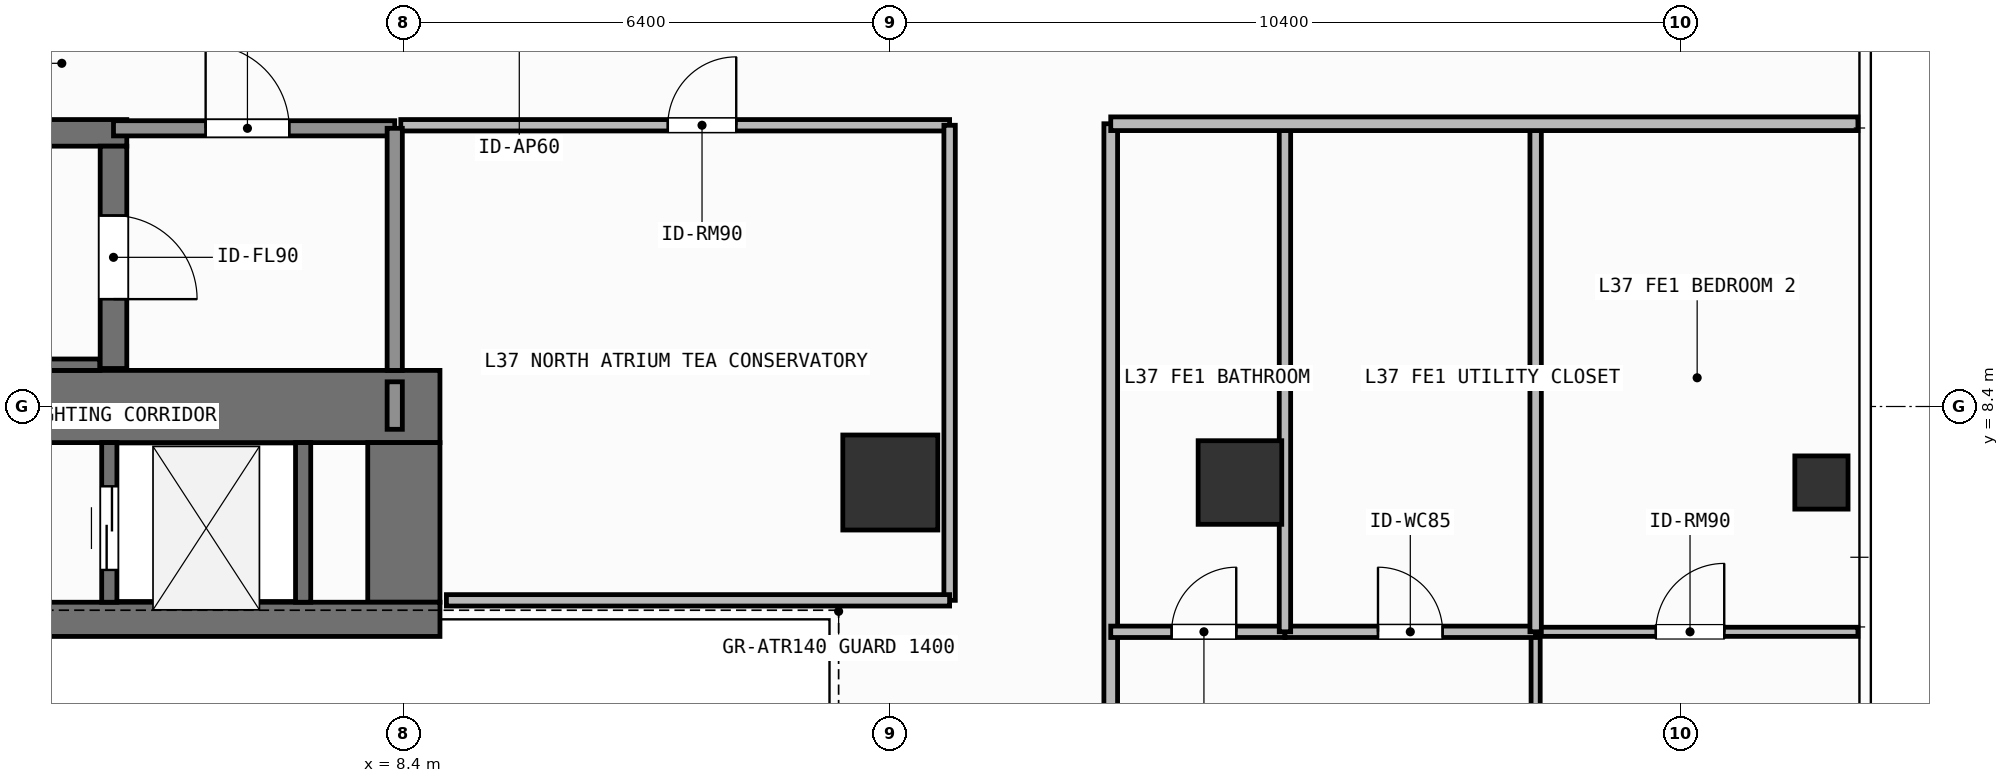
"""IFC4 building model, lengths in metres.
Left out: names, types, materials, properties, quantities, classifications, styles, units other than length and angle.
Written with IfcOpenShell. Run it as: python <this file> out.ifc"""

import sys

from ifc_helpers import new_model, si_unit, direction, frame, frame_2d, origin, origin_2d, place, context, subcontext, project, spatial, rectangle, hollow_rectangle, extrude, element, fill, save


model = new_model("IFC4")
c1 = context("Model", 3, precision=1e-05, world=origin(), true_north=direction((0.0, 1.0)))
c2 = subcontext(c1, "Body", "Model", "MODEL_VIEW")
j1 = project(units=[si_unit("LENGTHUNIT", "METRE"), si_unit("PLANEANGLEUNIT", "RADIAN")], contexts=[c1])
p1 = place(None, origin())
s1 = spatial("IfcSite", under=j1, at=p1, CompositionType="ELEMENT")
p2 = place(p1, origin())
s2 = spatial("IfcBuilding", under=s1, at=p2, CompositionType="ELEMENT")
p3 = place(p2, frame((0.0, 0.0, 148.5)))
s3 = spatial("IfcBuildingStorey", under=s2, at=p3, CompositionType="ELEMENT", Elevation=148.5)
p4 = place(p3, frame((-7.55, 8.4, 0.0), z_axis=(0.0, 0.0, 1.0), x_axis=(1.0, 0.0, 0.0)))
e1 = element("IfcWall", 1, at=p4, inside=s3, PredefinedType="SHEAR", context=c2, shape_type="SweptSolid", body=[
    extrude(rectangle(XDim=16.425, YDim=0.95, at=frame_2d((8.212, 0.0))), origin(), (0.0, 0.0, 1.0), 3.9),
])
p5 = place(p3, frame((8.4, 5.825, 0.0), z_axis=(0.0, 0.0, 1.0), x_axis=(0.0, 1.0, 0.0)))
e2 = element("IfcWall", 2, at=p5, inside=s3, PredefinedType="SHEAR", context=c2, shape_type="SweptSolid", body=[
    extrude(rectangle(XDim=2.1, YDim=0.95, at=frame_2d((1.05, 0.0))), origin(), (0.0, 0.0, 1.0), 3.9),
])
p6 = place(p3, frame((3.045, 5.6, 0.0), z_axis=(0.0, 0.0, 1.0), x_axis=(1.0, 0.0, 0.0)))
e3 = element("IfcWall", 3, at=p6, inside=s3, PredefinedType="SHEAR", context=c2, shape_type="SweptSolid", body=[
    extrude(rectangle(XDim=5.83, YDim=0.45, at=frame_2d((2.915, 0.0))), origin(), (0.0, 0.0, 1.0), 3.9),
])
p7 = place(p3, frame((-2.555, 12.0, 0.0), z_axis=(0.0, 0.0, 1.0), x_axis=(1.0, 0.0, 0.0)))
e4 = element("IfcWall", 4, at=p7, inside=s3, PredefinedType="SHEAR", context=c2, shape_type="SweptSolid", body=[
    extrude(rectangle(XDim=7.31, YDim=0.35, at=frame_2d((3.655, 0.0))), origin(), (0.0, 0.0, 1.0), 3.9),
])
p8 = place(p3, frame((-2.2, 8.95, 0.0), z_axis=(0.0, 0.0, 1.0), x_axis=(1.0, 0.0, 0.0)))
e5 = element("IfcWall", 5, at=p8, inside=s3, PredefinedType="SHEAR", context=c2, shape_type="SweptSolid", body=[
    extrude(rectangle(XDim=6.6, YDim=0.15, at=frame_2d((3.3, 0.0))), origin(), (0.0, 0.0, 1.0), 3.9),
])
p9 = place(p3, frame((4.58, 11.825, 0.0), z_axis=(0.0, 0.0, 1.0), x_axis=(0.0, -1.0, 0.0)))
e6 = element("IfcWall", 6, at=p9, inside=s3, PredefinedType="SHEAR", context=c2, shape_type="SweptSolid", body=[
    extrude(rectangle(XDim=2.925, YDim=0.35, at=frame_2d((1.462, 0.0))), origin(), (0.0, 0.0, 1.0), 3.9),
])
p10 = place(p9, frame((0.913, 0.0, 0.0)))
e7 = element("IfcOpeningElement", 7, at=p10, cuts=e6, PredefinedType="OPENING", context=c2, shape_type="SweptSolid", body=[
    extrude(rectangle(XDim=1.1, YDim=2.15, at=frame_2d((0.55, 1.075))), frame((0.0, 0.185, 0.0), z_axis=(0.0, -1.0, 0.0), x_axis=(1.0, 0.0, 0.0)), (0.0, 0.0, 1.0), 0.37),
])
p11 = place(p3, frame((14.8, 7.4, 0.0), z_axis=(0.0, 0.0, 1.0), x_axis=(1.0, 0.0, 0.0)))
e8 = element("IfcColumn", 8, at=p11, inside=s3, PredefinedType="COLUMN", context=c2, shape_type="SweptSolid", body=[
    extrude(rectangle(XDim=1.25, YDim=1.25, at=origin_2d()), origin(), (0.0, 0.0, 1.0), 3.9),
])
p12 = place(p3, frame((19.4, 7.4, 0.0), z_axis=(0.0, 0.0, 1.0), x_axis=(1.0, 0.0, 0.0)))
e9 = element("IfcColumn", 9, at=p12, inside=s3, PredefinedType="COLUMN", context=c2, shape_type="SweptSolid", body=[
    extrude(rectangle(XDim=1.1, YDim=1.1, at=origin_2d()), origin(), (0.0, 0.0, 1.0), 3.9),
])
p13 = place(p3, frame((27.05, 7.4, 0.0), z_axis=(0.0, 0.0, 1.0), x_axis=(1.0, 0.0, 0.0)))
e10 = element("IfcColumn", 10, at=p13, inside=s3, PredefinedType="COLUMN", context=c2, shape_type="SweptSolid", body=[
    extrude(hollow_rectangle(XDim=0.7, YDim=0.7, WallThickness=0.032, at=origin_2d()), origin(), (0.0, 0.0, 1.0), 3.9),
])
p14 = place(p3, frame((4.525, 5.825, 0.0), z_axis=(0.0, 0.0, 1.0), x_axis=(0.0, 1.0, 0.0)))
e11 = element("IfcWall", 11, at=p14, inside=s3, PredefinedType="SHEAR", context=c2, shape_type="SweptSolid", body=[
    extrude(rectangle(XDim=2.1, YDim=0.2, at=frame_2d((1.05, 0.0))), origin(), (0.0, 0.0, 1.0), 3.68),
])
p15 = place(p14, frame((0.425, 0.0, 0.0)))
e12 = element("IfcOpeningElement", 12, at=p15, cuts=e11, PredefinedType="OPENING", context=c2, shape_type="SweptSolid", body=[
    extrude(rectangle(XDim=1.1, YDim=2.2, at=frame_2d((0.55, 1.1))), frame((0.0, 0.11, 0.0), z_axis=(0.0, -1.0, 0.0), x_axis=(1.0, 0.0, 0.0)), (0.0, 0.0, 1.0), 0.22),
])
p16 = place(p3, frame((7.075, 5.825, 0.0), z_axis=(0.0, 0.0, 1.0), x_axis=(0.0, 1.0, 0.0)))
e13 = element("IfcWall", 13, at=p16, inside=s3, PredefinedType="SHEAR", context=c2, shape_type="SweptSolid", body=[
    extrude(rectangle(XDim=2.1, YDim=0.2, at=frame_2d((1.05, 0.0))), origin(), (0.0, 0.0, 1.0), 3.68),
])
p17 = place(p3, frame((4.58, 12.06, 0.0), z_axis=(0.0, 0.0, 1.0), x_axis=(1.0, 0.0, 0.0)))
e14 = element("IfcWall", 14, at=p17, inside=s3, PredefinedType="SOLIDWALL", context=c2, shape_type="SweptSolid", body=[
    extrude(rectangle(XDim=3.7, YDim=0.2, at=frame_2d((1.85, 0.0))), origin(), (0.0, 0.0, 1.0), 3.68),
])
p18 = place(p17, frame((1.212, 0.0, 0.0)))
e15 = element("IfcOpeningElement", 15, at=p18, cuts=e14, PredefinedType="OPENING", context=c2, shape_type="SweptSolid", body=[
    extrude(rectangle(XDim=1.1, YDim=2.15, at=frame_2d((0.55, 1.075))), frame((0.0, 0.11, 0.0), z_axis=(0.0, -1.0, 0.0), x_axis=(1.0, 0.0, 0.0)), (0.0, 0.0, 1.0), 0.22),
])
p19 = place(p3, frame((8.36, 12.1, 0.0), z_axis=(0.0, 0.0, 1.0), x_axis=(1.0, 0.0, 0.0)))
e16 = element("IfcWall", 16, at=p19, inside=s3, PredefinedType="PARTITIONING", context=c2, shape_type="SweptSolid", body=[
    extrude(rectangle(XDim=7.22, YDim=0.15, at=frame_2d((3.61, 0.0))), origin(), (0.0, 0.0, 1.0), 3.68),
])
p20 = place(p19, frame((3.513, 0.0, 0.0)))
e17 = element("IfcOpeningElement", 17, at=p20, cuts=e16, PredefinedType="OPENING", context=c2, shape_type="SweptSolid", body=[
    extrude(rectangle(XDim=0.9, YDim=2.1, at=frame_2d((0.45, 1.05))), frame((0.0, 0.085, 0.0), z_axis=(0.0, -1.0, 0.0), x_axis=(1.0, 0.0, 0.0)), (0.0, 0.0, 1.0), 0.17),
])
p21 = place(p3, frame((17.7, -12.12, 0.0), z_axis=(0.0, 0.0, 1.0), x_axis=(0.0, 1.0, 0.0)))
e18 = element("IfcWall", 18, at=p21, inside=s3, PredefinedType="PARTITIONING", context=c2, shape_type="SweptSolid", body=[
    extrude(rectangle(XDim=24.24, YDim=0.18, at=frame_2d((12.12, 0.0))), origin(), (0.0, 0.0, 1.0), 3.68),
])
p22 = place(p21, frame((11.62, 0.0, 0.0)))
e19 = element("IfcOpeningElement", 19, at=p22, cuts=e18, PredefinedType="OPENING", context=c2, shape_type="SweptSolid", body=[
    extrude(rectangle(XDim=1.0, YDim=2.2, at=frame_2d((0.5, 1.1))), frame((0.0, 0.1, 0.0), z_axis=(0.0, -1.0, 0.0), x_axis=(1.0, 0.0, 0.0)), (0.0, 0.0, 1.0), 0.2),
])
p23 = place(p3, frame((23.29, -5.436, 0.0), z_axis=(0.0, 0.0, 1.0), x_axis=(0.0, 1.0, 0.0)))
e20 = element("IfcWall", 20, at=p23, inside=s3, PredefinedType="PARTITIONING", context=c2, shape_type="SweptSolid", body=[
    extrude(rectangle(XDim=10.872, YDim=0.12, at=frame_2d((5.436, 0.0))), origin(), (0.0, 0.0, 1.0), 3.68),
])
p24 = place(p23, frame((4.986, 0.0, 0.0)))
e21 = element("IfcOpeningElement", 21, at=p24, cuts=e20, PredefinedType="OPENING", context=c2, shape_type="SweptSolid", body=[
    extrude(rectangle(XDim=0.9, YDim=2.1, at=frame_2d((0.45, 1.05))), frame((0.0, 0.07, 0.0), z_axis=(0.0, -1.0, 0.0), x_axis=(1.0, 0.0, 0.0)), (0.0, 0.0, 1.0), 0.14),
])
p25 = place(p3, frame((17.7, 5.436, 0.0), z_axis=(0.0, 0.0, 1.0), x_axis=(1.0, 0.0, 0.0)))
e22 = element("IfcWall", 22, at=p25, inside=s3, PredefinedType="PARTITIONING", context=c2, shape_type="SweptSolid", body=[
    extrude(rectangle(XDim=2.292, YDim=0.15, at=frame_2d((1.146, 0.0))), origin(), (0.0, 0.0, 1.0), 3.68),
])
p26 = place(p25, frame((0.801, 0.0, 0.0)))
e23 = element("IfcOpeningElement", 23, at=p26, cuts=e22, PredefinedType="OPENING", context=c2, shape_type="SweptSolid", body=[
    extrude(rectangle(XDim=0.85, YDim=2.1, at=frame_2d((0.425, 1.05))), frame((0.0, 0.085, 0.0), z_axis=(0.0, -1.0, 0.0), x_axis=(1.0, 0.0, 0.0)), (0.0, 0.0, 1.0), 0.17),
])
p27 = place(p3, frame((19.992, 5.436, 0.0), z_axis=(0.0, 0.0, 1.0), x_axis=(1.0, 0.0, 0.0)))
e24 = element("IfcWall", 24, at=p27, inside=s3, PredefinedType="PARTITIONING", context=c2, shape_type="SweptSolid", body=[
    extrude(rectangle(XDim=3.298, YDim=0.15, at=frame_2d((1.649, 0.0))), origin(), (0.0, 0.0, 1.0), 3.68),
])
p28 = place(p27, frame((1.224, 0.0, 0.0)))
e25 = element("IfcOpeningElement", 25, at=p28, cuts=e24, PredefinedType="OPENING", context=c2, shape_type="SweptSolid", body=[
    extrude(rectangle(XDim=0.85, YDim=2.1, at=frame_2d((0.425, 1.05))), frame((0.0, 0.085, 0.0), z_axis=(0.0, -1.0, 0.0), x_axis=(1.0, 0.0, 0.0)), (0.0, 0.0, 1.0), 0.17),
])
p29 = place(p3, frame((23.29, 5.436, 0.0), z_axis=(0.0, 0.0, 1.0), x_axis=(1.0, 0.0, 0.0)))
e26 = element("IfcWall", 26, at=p29, inside=s3, PredefinedType="PARTITIONING", context=c2, shape_type="SweptSolid", body=[
    extrude(rectangle(XDim=4.24, YDim=0.12, at=frame_2d((2.12, 0.0))), origin(), (0.0, 0.0, 1.0), 3.68),
])
p30 = place(p29, frame((1.581, 0.0, 0.0)))
e27 = element("IfcOpeningElement", 27, at=p30, cuts=e26, PredefinedType="OPENING", context=c2, shape_type="SweptSolid", body=[
    extrude(rectangle(XDim=0.9, YDim=2.1, at=frame_2d((0.45, 1.05))), frame((0.0, 0.07, 0.0), z_axis=(0.0, -1.0, 0.0), x_axis=(1.0, 0.0, 0.0)), (0.0, 0.0, 1.0), 0.14),
])
p31 = place(p3, frame((8.28, 8.875, 0.0), z_axis=(0.0, 0.0, 1.0), x_axis=(0.0, 1.0, 0.0)))
e28 = element("IfcWall", 28, at=p31, inside=s3, PredefinedType="SOLIDWALL", context=c2, shape_type="SweptSolid", body=[
    extrude(rectangle(XDim=3.185, YDim=0.2, at=frame_2d((1.593, 0.0))), origin(), (0.0, 0.0, 1.0), 3.68),
])
p32 = place(p3, frame((8.28, 8.1, 0.0), z_axis=(0.0, 0.0, 1.0), x_axis=(0.0, 1.0, 0.0)))
e29 = element("IfcWall", 29, at=p32, inside=s3, PredefinedType="SOLIDWALL", context=c2, shape_type="SweptSolid", body=[
    extrude(rectangle(XDim=0.625, YDim=0.2, at=frame_2d((0.312, 0.0))), origin(), (0.0, 0.0, 1.0), 3.68),
])
p33 = place(p3, frame((15.58, 5.85, 0.0), z_axis=(0.0, 0.0, 1.0), x_axis=(0.0, 1.0, 0.0)))
e30 = element("IfcWall", 30, at=p33, inside=s3, PredefinedType="PARTITIONING", context=c2, shape_type="SweptSolid", body=[
    extrude(rectangle(XDim=6.25, YDim=0.15, at=frame_2d((3.125, 0.0))), origin(), (0.0, 0.0, 1.0), 3.68),
])
p34 = place(p3, frame((8.96, 5.85, 0.0), z_axis=(0.0, 0.0, 1.0), x_axis=(1.0, 0.0, 0.0)))
e31 = element("IfcWall", 31, at=p34, inside=s3, PredefinedType="PARTITIONING", context=c2, shape_type="SweptSolid", body=[
    extrude(rectangle(XDim=6.62, YDim=0.15, at=frame_2d((3.31, 0.0))), origin(), (0.0, 0.0, 1.0), 3.68),
])
for number, where, z_axis, x_axis in (
    (32, (19.992, 5.436, 0.0), (0.0, 0.0, 1.0), (0.0, 1.0, 0.0)),
    (33, (23.29, 5.436, 0.0), (0.0, 0.0, 1.0), (0.0, 1.0, 0.0)),
):
    element("IfcWall", number, at=place(p3, frame(where, z_axis=z_axis, x_axis=x_axis)), inside=s3, PredefinedType="PARTITIONING", context=c2, shape_type="SweptSolid", body=[
        extrude(rectangle(XDim=6.684, YDim=0.15, at=frame_2d((3.342, 0.0))), origin(), (0.0, 0.0, 1.0), 3.68),
    ])
p35 = place(p3, frame((17.7, 12.12, 0.0), z_axis=(0.0, 0.0, 1.0), x_axis=(1.0, 0.0, 0.0)))
e34 = element("IfcWall", 34, at=p35, inside=s3, PredefinedType="PARTITIONING", context=c2, shape_type="SweptSolid", body=[
    extrude(rectangle(XDim=9.83, YDim=0.18, at=frame_2d((4.915, 0.0))), origin(), (0.0, 0.0, 1.0), 3.68),
])
p36 = place(p15, origin())
e35 = element("IfcDoor", 35, at=p36, inside=s3, OperationType="SLIDING_TO_LEFT", PredefinedType="DOOR", context=c2, shape_type="SweptSolid", body=[
    extrude(rectangle(XDim=1.1, YDim=2.2, at=frame_2d((0.55, 1.1))), frame((0.0, 0.025, 0.0), z_axis=(0.0, -1.0, 0.0), x_axis=(1.0, 0.0, 0.0)), (0.0, 0.0, 1.0), 0.05),
])
fill(e12, e35)
p37 = place(p10, origin())
e36 = element("IfcDoor", 36, at=p37, inside=s3, OperationType="SINGLE_SWING_RIGHT", PredefinedType="DOOR", context=c2, shape_type="SweptSolid", body=[
    extrude(rectangle(XDim=1.1, YDim=2.15, at=frame_2d((0.55, 1.075))), frame((0.0, 0.025, 0.0), z_axis=(0.0, -1.0, 0.0), x_axis=(1.0, 0.0, 0.0)), (0.0, 0.0, 1.0), 0.05),
])
fill(e7, e36)
p38 = place(p18, origin())
e37 = element("IfcDoor", 37, at=p38, inside=s3, OperationType="SINGLE_SWING_LEFT", PredefinedType="DOOR", context=c2, shape_type="SweptSolid", body=[
    extrude(rectangle(XDim=1.1, YDim=2.15, at=frame_2d((0.55, 1.075))), frame((0.0, 0.025, 0.0), z_axis=(0.0, -1.0, 0.0), x_axis=(1.0, 0.0, 0.0)), (0.0, 0.0, 1.0), 0.05),
])
fill(e15, e37)
p39 = place(p20, origin())
e38 = element("IfcDoor", 38, at=p39, inside=s3, OperationType="SINGLE_SWING_RIGHT", PredefinedType="DOOR", context=c2, shape_type="SweptSolid", body=[
    extrude(rectangle(XDim=0.9, YDim=2.1, at=frame_2d((0.45, 1.05))), frame((0.0, 0.025, 0.0), z_axis=(0.0, -1.0, 0.0), x_axis=(1.0, 0.0, 0.0)), (0.0, 0.0, 1.0), 0.05),
])
fill(e17, e38)
p40 = place(p26, origin())
e39 = element("IfcDoor", 39, at=p40, inside=s3, OperationType="SINGLE_SWING_RIGHT", PredefinedType="DOOR", context=c2, shape_type="SweptSolid", body=[
    extrude(rectangle(XDim=0.85, YDim=2.1, at=frame_2d((0.425, 1.05))), frame((0.0, 0.025, 0.0), z_axis=(0.0, -1.0, 0.0), x_axis=(1.0, 0.0, 0.0)), (0.0, 0.0, 1.0), 0.05),
])
fill(e23, e39)
p41 = place(p28, origin())
e40 = element("IfcDoor", 40, at=p41, inside=s3, OperationType="SINGLE_SWING_LEFT", PredefinedType="DOOR", context=c2, shape_type="SweptSolid", body=[
    extrude(rectangle(XDim=0.85, YDim=2.1, at=frame_2d((0.425, 1.05))), frame((0.0, 0.025, 0.0), z_axis=(0.0, -1.0, 0.0), x_axis=(1.0, 0.0, 0.0)), (0.0, 0.0, 1.0), 0.05),
])
fill(e25, e40)
p42 = place(p30, origin())
e41 = element("IfcDoor", 41, at=p42, inside=s3, OperationType="SINGLE_SWING_RIGHT", PredefinedType="DOOR", context=c2, shape_type="SweptSolid", body=[
    extrude(rectangle(XDim=0.9, YDim=2.1, at=frame_2d((0.45, 1.05))), frame((0.0, 0.025, 0.0), z_axis=(0.0, -1.0, 0.0), x_axis=(1.0, 0.0, 0.0)), (0.0, 0.0, 1.0), 0.05),
])
fill(e27, e41)
save(model, sys.argv[1])
